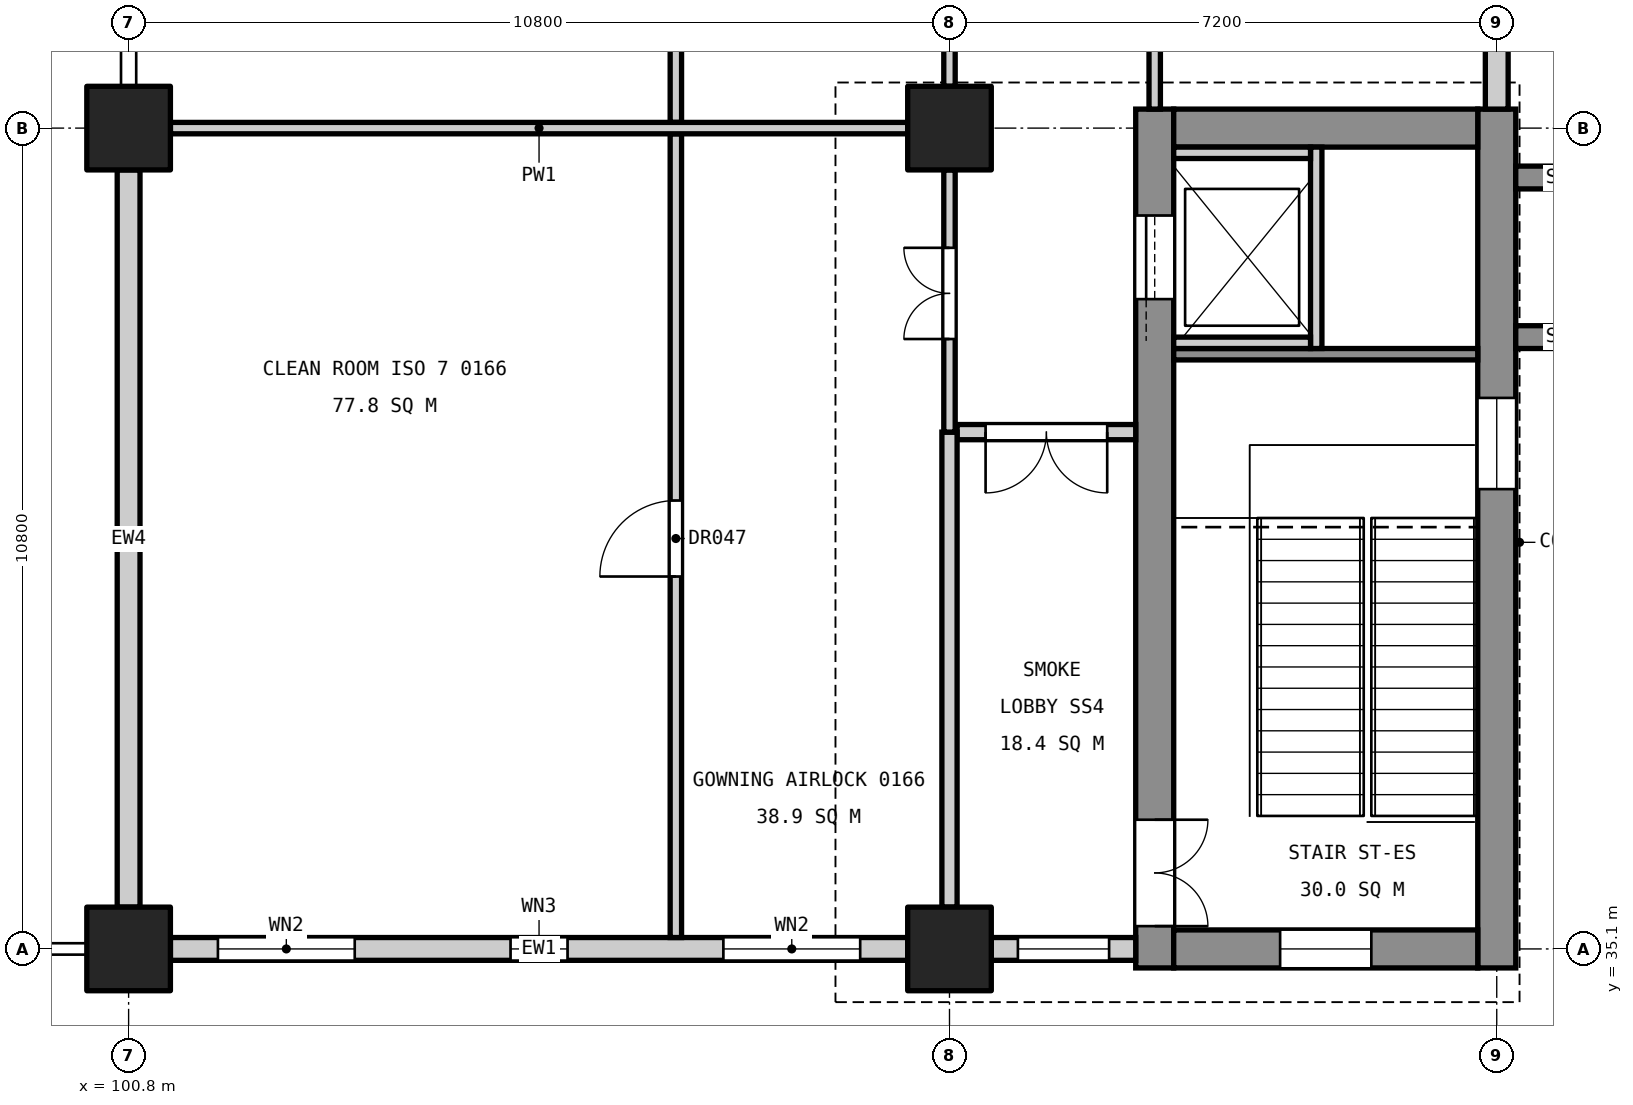
"""IFC4 building model, lengths in metres.
Left out: names, types, materials, properties, quantities, classifications, styles, units other than length and angle.
Written with IfcOpenShell. Run it as: python <this file> out.ifc"""

import sys

from ifc_helpers import new_model, si_unit, direction, frame, frame_2d, origin, origin_2d, place, context, subcontext, project, spatial, rectangle, extrude, element, fill, save


model = new_model("IFC4")
c1 = context("Model", 3, precision=1e-05, world=origin(), true_north=direction((0.0, 1.0)))
c2 = subcontext(c1, "Body", "Model", "MODEL_VIEW")
j1 = project(units=[si_unit("LENGTHUNIT", "METRE"), si_unit("PLANEANGLEUNIT", "RADIAN")], contexts=[c1])
p1 = place(None, origin())
s1 = spatial("IfcSite", under=j1, at=p1, CompositionType="ELEMENT")
p2 = place(p1, origin())
s2 = spatial("IfcBuilding", under=s1, at=p2, CompositionType="ELEMENT")
p3 = place(p2, frame((0.0, 0.0, 6.0)))
s3 = spatial("IfcBuildingStorey", under=s2, at=p3, CompositionType="ELEMENT", Elevation=6.0)
for number, where, z_axis, x_axis in (
    (1, (111.6, 35.1, 0.0), (0.0, 0.0, 1.0), (1.0, 0.0, 0.0)),
    (2, (111.6, 45.9, 0.0), (0.0, 0.0, 1.0), (1.0, 0.0, 0.0)),
    (3, (100.8, 35.1, 0.0), (0.0, 0.0, 1.0), (1.0, 0.0, 0.0)),
    (4, (100.8, 45.9, 0.0), (0.0, 0.0, 1.0), (1.0, 0.0, 0.0)),
):
    element("IfcColumn", number, at=place(p3, frame(where, z_axis=z_axis, x_axis=x_axis)), inside=s3, PredefinedType="COLUMN", context=c2, shape_type="SweptSolid", body=[
        extrude(rectangle(XDim=1.1, YDim=1.1, at=origin_2d()), origin(), (0.0, 0.0, 1.0), 5.4),
    ])
p4 = place(p3, frame((118.8, 34.85, 0.0), z_axis=(0.0, 0.0, 1.0), x_axis=(0.0, 1.0, 0.0)))
e5 = element("IfcWall", 5, at=p4, inside=s3, PredefinedType="SHEAR", context=c2, shape_type="SweptSolid", body=[
    extrude(rectangle(XDim=11.3, YDim=0.5, at=frame_2d((5.65, 0.0))), origin(), (0.0, 0.0, 1.0), 5.1),
])
p5 = place(p4, frame((6.3, 0.0, 3.4)))
e6 = element("IfcOpeningElement", 6, at=p5, cuts=e5, PredefinedType="OPENING", context=c2, shape_type="SweptSolid", body=[
    extrude(rectangle(XDim=1.2, YDim=0.9, at=frame_2d((0.6, 0.45))), frame((0.0, 0.26, 0.0), z_axis=(0.0, -1.0, 0.0), x_axis=(1.0, 0.0, 0.0)), (0.0, 0.0, 1.0), 0.52),
])
p6 = place(p3, frame((114.3, 34.85, 0.0), z_axis=(0.0, 0.0, 1.0), x_axis=(0.0, 1.0, 0.0)))
e7 = element("IfcWall", 7, at=p6, inside=s3, PredefinedType="SHEAR", context=c2, shape_type="SweptSolid", body=[
    extrude(rectangle(XDim=11.3, YDim=0.5, at=frame_2d((5.65, 0.0))), origin(), (0.0, 0.0, 1.0), 5.1),
])
p7 = place(p6, frame((0.55, 0.0, 0.0)))
e8 = element("IfcOpeningElement", 8, at=p7, cuts=e7, PredefinedType="OPENING", context=c2, shape_type="SweptSolid", body=[
    extrude(rectangle(XDim=1.4, YDim=2.1, at=frame_2d((0.7, 1.05))), frame((0.0, 0.26, 0.0), z_axis=(0.0, -1.0, 0.0), x_axis=(1.0, 0.0, 0.0)), (0.0, 0.0, 1.0), 0.52),
])
p8 = place(p6, frame((8.8, 0.0, 0.0)))
e9 = element("IfcOpeningElement", 9, at=p8, cuts=e7, PredefinedType="OPENING", context=c2, shape_type="SweptSolid", body=[
    extrude(rectangle(XDim=1.1, YDim=2.1, at=frame_2d((0.55, 1.05))), frame((0.0, 0.26, 0.0), z_axis=(0.0, -1.0, 0.0), x_axis=(1.0, 0.0, 0.0)), (0.0, 0.0, 1.0), 0.52),
])
p9 = place(p3, frame((118.55, 35.1, 0.0), z_axis=(0.0, 0.0, 1.0), x_axis=(-1.0, 0.0, 0.0)))
e10 = element("IfcWall", 10, at=p9, inside=s3, PredefinedType="SHEAR", context=c2, shape_type="SweptSolid", body=[
    extrude(rectangle(XDim=4.0, YDim=0.5, at=frame_2d((2.0, 0.0))), origin(), (0.0, 0.0, 1.0), 5.1),
])
p10 = place(p9, frame((1.4, 0.0, 3.4)))
e11 = element("IfcOpeningElement", 11, at=p10, cuts=e10, PredefinedType="OPENING", context=c2, shape_type="SweptSolid", body=[
    extrude(rectangle(XDim=1.2, YDim=0.9, at=frame_2d((0.6, 0.45))), frame((0.0, 0.26, 0.0), z_axis=(0.0, -1.0, 0.0), x_axis=(1.0, 0.0, 0.0)), (0.0, 0.0, 1.0), 0.52),
])
p11 = place(p3, frame((118.55, 45.9, 0.0), z_axis=(0.0, 0.0, 1.0), x_axis=(-1.0, 0.0, 0.0)))
e12 = element("IfcWall", 12, at=p11, inside=s3, PredefinedType="SHEAR", context=c2, shape_type="SweptSolid", body=[
    extrude(rectangle(XDim=4.0, YDim=0.5, at=frame_2d((2.0, 0.0))), origin(), (0.0, 0.0, 1.0), 5.1),
])
for number, where, z_axis, x_axis in (
    (13, (119.05, 43.15, 0.0), (0.0, 0.0, 1.0), (1.0, 0.0, 0.0)),
    (14, (119.05, 45.25, 0.0), (0.0, 0.0, 1.0), (1.0, 0.0, 0.0)),
):
    element("IfcWall", number, at=place(p3, frame(where, z_axis=z_axis, x_axis=x_axis)), inside=s3, PredefinedType="SHEAR", context=c2, shape_type="SweptSolid", body=[
        extrude(rectangle(XDim=1.25, YDim=0.3, at=frame_2d((0.625, 0.0))), origin(), (0.0, 0.0, 1.0), 5.4),
    ])
p12 = place(p3, frame((118.55, 42.925, 0.0), z_axis=(0.0, 0.0, 1.0), x_axis=(-1.0, 0.0, 0.0)))
e15 = element("IfcWall", 15, at=p12, inside=s3, PredefinedType="SOLIDWALL", context=c2, shape_type="SweptSolid", body=[
    extrude(rectangle(XDim=4.0, YDim=0.15, at=frame_2d((2.0, 0.0))), origin(), (0.0, 0.0, 1.0), 5.1),
])
p13 = place(p3, frame((116.425, 43.0, 0.0), z_axis=(0.0, 0.0, 1.0), x_axis=(0.0, 1.0, 0.0)))
e16 = element("IfcWall", 16, at=p13, inside=s3, PredefinedType="SOLIDWALL", context=c2, shape_type="SweptSolid", body=[
    extrude(rectangle(XDim=2.65, YDim=0.15, at=frame_2d((1.325, 0.0))), origin(), (0.0, 0.0, 1.0), 5.4),
])
for number, where, z_axis, x_axis in (
    (17, (116.35, 43.075, 0.0), (0.0, 0.0, 1.0), (-1.0, 0.0, 0.0)),
    (18, (116.35, 45.575, 0.0), (0.0, 0.0, 1.0), (-1.0, 0.0, 0.0)),
):
    element("IfcWall", number, at=place(p3, frame(where, z_axis=z_axis, x_axis=x_axis)), inside=s3, PredefinedType="SOLIDWALL", context=c2, shape_type="SweptSolid", body=[
        extrude(rectangle(XDim=1.8, YDim=0.15, at=frame_2d((0.9, 0.0))), origin(), (0.0, 0.0, 1.0), 5.4),
    ])
p14 = place(p3, frame((118.8, 46.15, 0.0), z_axis=(0.0, 0.0, 1.0), x_axis=(0.0, 1.0, 0.0)))
e19 = element("IfcWall", 19, at=p14, inside=s3, PredefinedType="STANDARD", context=c2, shape_type="SweptSolid", body=[
    extrude(rectangle(XDim=10.0, YDim=0.3, at=frame_2d((5.0, 0.0))), origin(), (0.0, 0.0, 1.0), 4.1),
])
p15 = place(p14, frame((1.3, 0.0, 0.8)))
e20 = element("IfcOpeningElement", 20, at=p15, cuts=e19, PredefinedType="OPENING", context=c2, shape_type="SweptSolid", body=[
    extrude(rectangle(XDim=0.75, YDim=1.2, at=frame_2d((0.375, 0.6))), frame((0.0, 0.16, 0.0), z_axis=(0.0, -1.0, 0.0), x_axis=(1.0, 0.0, 0.0)), (0.0, 0.0, 1.0), 0.32),
])
p16 = place(p14, frame((4.25, 0.0, 0.9)))
e21 = element("IfcOpeningElement", 21, at=p16, cuts=e19, PredefinedType="OPENING", context=c2, shape_type="SweptSolid", body=[
    extrude(rectangle(XDim=1.8, YDim=3.0, at=frame_2d((0.9, 1.5))), frame((0.0, 0.16, 0.0), z_axis=(0.0, -1.0, 0.0), x_axis=(1.0, 0.0, 0.0)), (0.0, 0.0, 1.0), 0.32),
])
p17 = place(p14, frame((7.575, 0.0, 0.9)))
e22 = element("IfcOpeningElement", 22, at=p17, cuts=e19, PredefinedType="OPENING", context=c2, shape_type="SweptSolid", body=[
    extrude(rectangle(XDim=1.8, YDim=3.0, at=frame_2d((0.9, 1.5))), frame((0.0, 0.16, 0.0), z_axis=(0.0, -1.0, 0.0), x_axis=(1.0, 0.0, 0.0)), (0.0, 0.0, 1.0), 0.32),
])
p18 = place(p3, frame((114.05, 35.1, 0.0), z_axis=(0.0, 0.0, 1.0), x_axis=(-1.0, 0.0, 0.0)))
e23 = element("IfcWall", 23, at=p18, inside=s3, PredefinedType="STANDARD", context=c2, shape_type="SweptSolid", body=[
    extrude(rectangle(XDim=1.9, YDim=0.3, at=frame_2d((0.95, 0.0))), origin(), (0.0, 0.0, 1.0), 4.3),
])
p19 = place(p18, frame((0.35, 0.0, 0.9)))
e24 = element("IfcOpeningElement", 24, at=p19, cuts=e23, PredefinedType="OPENING", context=c2, shape_type="SweptSolid", body=[
    extrude(rectangle(XDim=1.2, YDim=2.4, at=frame_2d((0.6, 1.2))), frame((0.0, 0.16, 0.0), z_axis=(0.0, -1.0, 0.0), x_axis=(1.0, 0.0, 0.0)), (0.0, 0.0, 1.0), 0.32),
])
p20 = place(p3, frame((111.05, 35.1, 0.0), z_axis=(0.0, 0.0, 1.0), x_axis=(-1.0, 0.0, 0.0)))
e25 = element("IfcWall", 25, at=p20, inside=s3, PredefinedType="STANDARD", context=c2, shape_type="SweptSolid", body=[
    extrude(rectangle(XDim=9.7, YDim=0.3, at=frame_2d((4.85, 0.0))), origin(), (0.0, 0.0, 1.0), 4.3),
])
p21 = place(p20, frame((0.625, 0.0, 0.9)))
e26 = element("IfcOpeningElement", 26, at=p21, cuts=e25, PredefinedType="OPENING", context=c2, shape_type="SweptSolid", body=[
    extrude(rectangle(XDim=1.8, YDim=3.0, at=frame_2d((0.9, 1.5))), frame((0.0, 0.16, 0.0), z_axis=(0.0, -1.0, 0.0), x_axis=(1.0, 0.0, 0.0)), (0.0, 0.0, 1.0), 0.32),
])
p22 = place(p20, frame((4.475, 0.0, 0.8)))
e27 = element("IfcOpeningElement", 27, at=p22, cuts=e25, PredefinedType="OPENING", context=c2, shape_type="SweptSolid", body=[
    extrude(rectangle(XDim=0.75, YDim=1.2, at=frame_2d((0.375, 0.6))), frame((0.0, 0.16, 0.0), z_axis=(0.0, -1.0, 0.0), x_axis=(1.0, 0.0, 0.0)), (0.0, 0.0, 1.0), 0.32),
])
p23 = place(p20, frame((7.275, 0.0, 0.9)))
e28 = element("IfcOpeningElement", 28, at=p23, cuts=e25, PredefinedType="OPENING", context=c2, shape_type="SweptSolid", body=[
    extrude(rectangle(XDim=1.8, YDim=3.0, at=frame_2d((0.9, 1.5))), frame((0.0, 0.16, 0.0), z_axis=(0.0, -1.0, 0.0), x_axis=(1.0, 0.0, 0.0)), (0.0, 0.0, 1.0), 0.32),
])
p24 = place(p3, frame((100.8, 35.65, 0.0), z_axis=(0.0, 0.0, 1.0), x_axis=(0.0, 1.0, 0.0)))
e29 = element("IfcWall", 29, at=p24, inside=s3, PredefinedType="STANDARD", context=c2, shape_type="SweptSolid", body=[
    extrude(rectangle(XDim=9.7, YDim=0.3, at=frame_2d((4.85, 0.0))), origin(), (0.0, 0.0, 1.0), 4.0),
])
p25 = place(p3, frame((114.3, 46.15, 0.0), z_axis=(0.0, 0.0, 1.0), x_axis=(0.0, 1.0, 0.0)))
e30 = element("IfcWall", 30, at=p25, inside=s3, PredefinedType="PARTITIONING", context=c2, shape_type="SweptSolid", body=[
    extrude(rectangle(XDim=10.4, YDim=0.15, at=frame_2d((5.2, 0.0))), origin(), (0.0, 0.0, 1.0), 4.0),
])
p26 = place(p25, frame((2.85, 0.0, 0.0)))
e31 = element("IfcOpeningElement", 31, at=p26, cuts=e30, PredefinedType="OPENING", context=c2, shape_type="SweptSolid", body=[
    extrude(rectangle(XDim=1.0, YDim=2.1, at=frame_2d((0.5, 1.05))), frame((0.0, 0.085, 0.0), z_axis=(0.0, -1.0, 0.0), x_axis=(1.0, 0.0, 0.0)), (0.0, 0.0, 1.0), 0.17),
])
p27 = place(p25, frame((8.25, 0.0, 0.0)))
e32 = element("IfcOpeningElement", 32, at=p27, cuts=e30, PredefinedType="OPENING", context=c2, shape_type="SweptSolid", body=[
    extrude(rectangle(XDim=1.0, YDim=2.1, at=frame_2d((0.5, 1.05))), frame((0.0, 0.085, 0.0), z_axis=(0.0, -1.0, 0.0), x_axis=(1.0, 0.0, 0.0)), (0.0, 0.0, 1.0), 0.17),
])
p28 = place(p3, frame((114.05, 41.9, 0.0), z_axis=(0.0, 0.0, 1.0), x_axis=(-1.0, 0.0, 0.0)))
e33 = element("IfcWall", 33, at=p28, inside=s3, PredefinedType="PARTITIONING", context=c2, shape_type="SweptSolid", body=[
    extrude(rectangle(XDim=2.35, YDim=0.2, at=frame_2d((1.175, 0.0))), origin(), (0.0, 0.0, 1.0), 4.0),
])
p29 = place(p28, frame((0.375, 0.0, 0.0)))
e34 = element("IfcOpeningElement", 34, at=p29, cuts=e33, PredefinedType="OPENING", context=c2, shape_type="SweptSolid", body=[
    extrude(rectangle(XDim=1.6, YDim=2.1, at=frame_2d((0.8, 1.05))), frame((0.0, 0.11, 0.0), z_axis=(0.0, -1.0, 0.0), x_axis=(1.0, 0.0, 0.0)), (0.0, 0.0, 1.0), 0.22),
])
p30 = place(p3, frame((111.6, 35.65, 0.0), z_axis=(0.0, 0.0, 1.0), x_axis=(0.0, 1.0, 0.0)))
e35 = element("IfcWall", 35, at=p30, inside=s3, PredefinedType="PARTITIONING", context=c2, shape_type="SweptSolid", body=[
    extrude(rectangle(XDim=6.25, YDim=0.2, at=frame_2d((3.125, 0.0))), origin(), (0.0, 0.0, 1.0), 4.0),
])
p31 = place(p3, frame((111.6, 41.9, 0.0), z_axis=(0.0, 0.0, 1.0), x_axis=(0.0, 1.0, 0.0)))
e36 = element("IfcWall", 36, at=p31, inside=s3, PredefinedType="PARTITIONING", context=c2, shape_type="SweptSolid", body=[
    extrude(rectangle(XDim=3.45, YDim=0.15, at=frame_2d((1.725, 0.0))), origin(), (0.0, 0.0, 1.0), 4.0),
])
p32 = place(p31, frame((1.225, 0.0, 0.0)))
e37 = element("IfcOpeningElement", 37, at=p32, cuts=e36, PredefinedType="OPENING", context=c2, shape_type="SweptSolid", body=[
    extrude(rectangle(XDim=1.2, YDim=2.1, at=frame_2d((0.6, 1.05))), frame((0.0, 0.085, 0.0), z_axis=(0.0, -1.0, 0.0), x_axis=(1.0, 0.0, 0.0)), (0.0, 0.0, 1.0), 0.17),
])
p33 = place(p3, frame((111.6, 46.45, 0.0), z_axis=(0.0, 0.0, 1.0), x_axis=(0.0, 1.0, 0.0)))
e38 = element("IfcWall", 38, at=p33, inside=s3, PredefinedType="PARTITIONING", context=c2, shape_type="SweptSolid", body=[
    extrude(rectangle(XDim=9.7, YDim=0.15, at=frame_2d((4.85, 0.0))), origin(), (0.0, 0.0, 1.0), 4.0),
])
p34 = place(p33, frame((4.35, 0.0, 0.0)))
e39 = element("IfcOpeningElement", 39, at=p34, cuts=e38, PredefinedType="OPENING", context=c2, shape_type="SweptSolid", body=[
    extrude(rectangle(XDim=1.2, YDim=2.1, at=frame_2d((0.6, 1.05))), frame((0.0, 0.085, 0.0), z_axis=(0.0, -1.0, 0.0), x_axis=(1.0, 0.0, 0.0)), (0.0, 0.0, 1.0), 0.17),
])
p35 = place(p3, frame((108.0, 35.25, 0.0), z_axis=(0.0, 0.0, 1.0), x_axis=(0.0, 1.0, 0.0)))
e40 = element("IfcWall", 40, at=p35, inside=s3, PredefinedType="PARTITIONING", context=c2, shape_type="SweptSolid", body=[
    extrude(rectangle(XDim=10.575, YDim=0.15, at=frame_2d((5.288, 0.0))), origin(), (0.0, 0.0, 1.0), 4.0),
])
p36 = place(p35, frame((4.75, 0.0, 0.0)))
e41 = element("IfcOpeningElement", 41, at=p36, cuts=e40, PredefinedType="OPENING", context=c2, shape_type="SweptSolid", body=[
    extrude(rectangle(XDim=1.0, YDim=2.1, at=frame_2d((0.5, 1.05))), frame((0.0, 0.085, 0.0), z_axis=(0.0, -1.0, 0.0), x_axis=(1.0, 0.0, 0.0)), (0.0, 0.0, 1.0), 0.17),
])
p37 = place(p3, frame((108.0, 45.975, 0.0), z_axis=(0.0, 0.0, 1.0), x_axis=(0.0, 1.0, 0.0)))
e42 = element("IfcWall", 42, at=p37, inside=s3, PredefinedType="PARTITIONING", context=c2, shape_type="SweptSolid", body=[
    extrude(rectangle(XDim=10.575, YDim=0.15, at=frame_2d((5.288, 0.0))), origin(), (0.0, 0.0, 1.0), 4.0),
])
p38 = place(p37, frame((4.825, 0.0, 0.0)))
e43 = element("IfcOpeningElement", 43, at=p38, cuts=e42, PredefinedType="OPENING", context=c2, shape_type="SweptSolid", body=[
    extrude(rectangle(XDim=1.0, YDim=2.1, at=frame_2d((0.5, 1.05))), frame((0.0, 0.085, 0.0), z_axis=(0.0, -1.0, 0.0), x_axis=(1.0, 0.0, 0.0)), (0.0, 0.0, 1.0), 0.17),
])
p39 = place(p3, frame((111.05, 45.9, 0.0), z_axis=(0.0, 0.0, 1.0), x_axis=(-1.0, 0.0, 0.0)))
e44 = element("IfcWall", 44, at=p39, inside=s3, PredefinedType="PARTITIONING", context=c2, shape_type="SweptSolid", body=[
    extrude(rectangle(XDim=9.7, YDim=0.15, at=frame_2d((4.85, 0.0))), origin(), (0.0, 0.0, 1.0), 4.3),
])
p40 = place(p7, frame((1.4, 0.0, 0.0), z_axis=(0.0, 0.0, 1.0), x_axis=(-1.0, 0.0, 0.0)))
e45 = element("IfcDoor", 45, at=p40, inside=s3, OperationType="DOUBLE_DOOR_SINGLE_SWING", PredefinedType="DOOR", context=c2, shape_type="SweptSolid", body=[
    extrude(rectangle(XDim=1.4, YDim=2.1, at=frame_2d((0.7, 1.05))), frame((0.0, 0.025, 0.0), z_axis=(0.0, -1.0, 0.0), x_axis=(1.0, 0.0, 0.0)), (0.0, 0.0, 1.0), 0.05),
])
fill(e8, e45)
p41 = place(p8, origin())
e46 = element("IfcDoor", 46, at=p41, inside=s3, OperationType="SLIDING_TO_LEFT", PredefinedType="DOOR", context=c2, shape_type="SweptSolid", body=[
    extrude(rectangle(XDim=1.1, YDim=2.1, at=frame_2d((0.55, 1.05))), frame((0.0, 0.025, 0.0), z_axis=(0.0, -1.0, 0.0), x_axis=(1.0, 0.0, 0.0)), (0.0, 0.0, 1.0), 0.05),
])
fill(e9, e46)
p42 = place(p19, origin())
e47 = element("IfcWindow", 47, at=p42, inside=s3, PartitioningType="SINGLE_PANEL", PredefinedType="WINDOW", context=c2, shape_type="SweptSolid", body=[
    extrude(rectangle(XDim=1.2, YDim=2.4, at=frame_2d((0.6, 1.2))), frame((0.0, 0.03, 0.0), z_axis=(0.0, -1.0, 0.0), x_axis=(1.0, 0.0, 0.0)), (0.0, 0.0, 1.0), 0.06),
])
fill(e24, e47)
p43 = place(p21, origin())
e48 = element("IfcWindow", 48, at=p43, inside=s3, PartitioningType="SINGLE_PANEL", PredefinedType="WINDOW", context=c2, shape_type="SweptSolid", body=[
    extrude(rectangle(XDim=1.8, YDim=3.0, at=frame_2d((0.9, 1.5))), frame((0.0, 0.03, 0.0), z_axis=(0.0, -1.0, 0.0), x_axis=(1.0, 0.0, 0.0)), (0.0, 0.0, 1.0), 0.06),
])
fill(e26, e48)
p44 = place(p22, origin())
e49 = element("IfcWindow", 49, at=p44, inside=s3, PartitioningType="SINGLE_PANEL", PredefinedType="WINDOW", context=c2, shape_type="SweptSolid", body=[
    extrude(rectangle(XDim=0.75, YDim=1.2, at=frame_2d((0.375, 0.6))), frame((0.0, 0.03, 0.0), z_axis=(0.0, -1.0, 0.0), x_axis=(1.0, 0.0, 0.0)), (0.0, 0.0, 1.0), 0.06),
])
fill(e27, e49)
p45 = place(p23, origin())
e50 = element("IfcWindow", 50, at=p45, inside=s3, PartitioningType="SINGLE_PANEL", PredefinedType="WINDOW", context=c2, shape_type="SweptSolid", body=[
    extrude(rectangle(XDim=1.8, YDim=3.0, at=frame_2d((0.9, 1.5))), frame((0.0, 0.03, 0.0), z_axis=(0.0, -1.0, 0.0), x_axis=(1.0, 0.0, 0.0)), (0.0, 0.0, 1.0), 0.06),
])
fill(e28, e50)
p46 = place(p5, origin())
e51 = element("IfcWindow", 51, at=p46, inside=s3, PartitioningType="SINGLE_PANEL", PredefinedType="WINDOW", context=c2, shape_type="SweptSolid", body=[
    extrude(rectangle(XDim=1.2, YDim=0.9, at=frame_2d((0.6, 0.45))), frame((0.0, 0.03, 0.0), z_axis=(0.0, -1.0, 0.0), x_axis=(1.0, 0.0, 0.0)), (0.0, 0.0, 1.0), 0.06),
])
fill(e6, e51)
p47 = place(p10, origin())
e52 = element("IfcWindow", 52, at=p47, inside=s3, PartitioningType="SINGLE_PANEL", PredefinedType="WINDOW", context=c2, shape_type="SweptSolid", body=[
    extrude(rectangle(XDim=1.2, YDim=0.9, at=frame_2d((0.6, 0.45))), frame((0.0, 0.03, 0.0), z_axis=(0.0, -1.0, 0.0), x_axis=(1.0, 0.0, 0.0)), (0.0, 0.0, 1.0), 0.06),
])
fill(e11, e52)
p48 = place(p36, origin())
e53 = element("IfcDoor", 53, at=p48, inside=s3, OperationType="SINGLE_SWING_LEFT", PredefinedType="DOOR", context=c2, shape_type="SweptSolid", body=[
    extrude(rectangle(XDim=1.0, YDim=2.1, at=frame_2d((0.5, 1.05))), frame((0.0, 0.025, 0.0), z_axis=(0.0, -1.0, 0.0), x_axis=(1.0, 0.0, 0.0)), (0.0, 0.0, 1.0), 0.05),
])
fill(e41, e53)
p49 = place(p32, origin())
e54 = element("IfcDoor", 54, at=p49, inside=s3, OperationType="DOUBLE_DOOR_SINGLE_SWING", PredefinedType="DOOR", context=c2, shape_type="SweptSolid", body=[
    extrude(rectangle(XDim=1.2, YDim=2.1, at=frame_2d((0.6, 1.05))), frame((0.0, 0.025, 0.0), z_axis=(0.0, -1.0, 0.0), x_axis=(1.0, 0.0, 0.0)), (0.0, 0.0, 1.0), 0.05),
])
fill(e37, e54)
p50 = place(p29, origin())
e55 = element("IfcDoor", 55, at=p50, inside=s3, OperationType="DOUBLE_DOOR_SINGLE_SWING", PredefinedType="DOOR", context=c2, shape_type="SweptSolid", body=[
    extrude(rectangle(XDim=1.6, YDim=2.1, at=frame_2d((0.8, 1.05))), frame((0.0, 0.025, 0.0), z_axis=(0.0, -1.0, 0.0), x_axis=(1.0, 0.0, 0.0)), (0.0, 0.0, 1.0), 0.05),
])
fill(e34, e55)
save(model, sys.argv[1])
